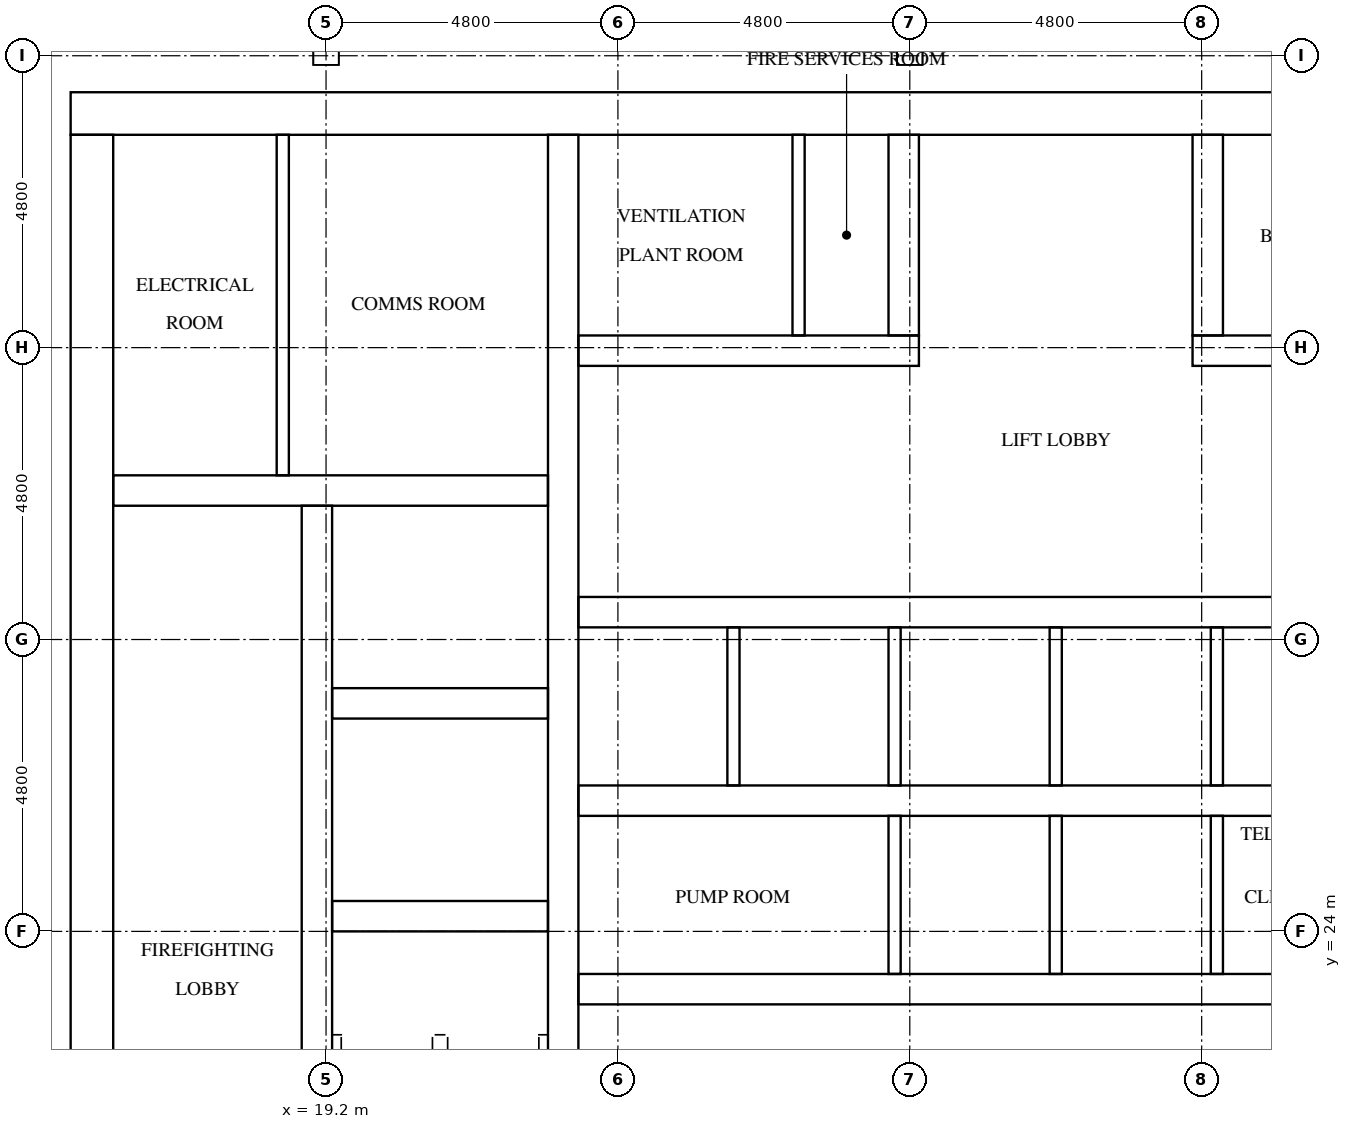
"""IFC4 building model, lengths in metres.
Left out: names, types, materials, properties, quantities, classifications, styles, units other than length and angle.
Written with IfcOpenShell. Run it as: python <this file> out.ifc"""

import sys

from ifc_helpers import new_model, si_unit, direction, frame, frame_2d, origin, place, context, subcontext, project, spatial, rectangle, extrude, element, fill, save


model = new_model("IFC4")
c1 = context("Model", 3, precision=1e-05, world=origin(), true_north=direction((0.0, 1.0)))
c2 = subcontext(c1, "Body", "Model", "MODEL_VIEW")
j1 = project(units=[si_unit("LENGTHUNIT", "METRE"), si_unit("PLANEANGLEUNIT", "RADIAN")], contexts=[c1])
p1 = place(None, origin())
s1 = spatial("IfcSite", under=j1, at=p1, CompositionType="ELEMENT")
p2 = place(p1, origin())
s2 = spatial("IfcBuilding", under=s1, at=p2, CompositionType="ELEMENT")
p3 = place(p2, frame((0.0, 0.0, 203.4)))
s3 = spatial("IfcBuildingStorey", under=s2, at=p3, CompositionType="ELEMENT", Elevation=203.4)
p4 = place(p3, frame((15.0, 37.45, 0.0), z_axis=(0.0, 0.0, 1.0), x_axis=(1.0, 0.0, 0.0)))
e1 = element("IfcWall", 1, at=p4, inside=s3, PredefinedType="SHEAR", context=c2, shape_type="SweptSolid", body=[
    extrude(rectangle(XDim=32.4, YDim=0.7, at=frame_2d((16.2, 0.0))), origin(), (0.0, 0.0, 1.0), 5.1),
])
p5 = place(p4, frame((15.3, 0.0, 0.0)))
e2 = element("IfcOpeningElement", 2, at=p5, cuts=e1, PredefinedType="OPENING", context=c2, shape_type="SweptSolid", body=[
    extrude(rectangle(XDim=1.8, YDim=2.1, at=frame_2d((0.9, 1.05))), frame((0.0, 0.36, 0.0), z_axis=(0.0, -1.0, 0.0), x_axis=(1.0, 0.0, 0.0)), (0.0, 0.0, 1.0), 0.72),
])
p6 = place(p4, frame((1.544, 0.0, 0.0)))
e3 = element("IfcOpeningElement", 3, at=p6, cuts=e1, PredefinedType="OPENING", context=c2, shape_type="SweptSolid", body=[
    extrude(rectangle(XDim=1.0, YDim=2.1, at=frame_2d((0.5, 1.05))), frame((0.0, 0.36, 0.0), z_axis=(0.0, -1.0, 0.0), x_axis=(1.0, 0.0, 0.0)), (0.0, 0.0, 1.0), 0.72),
])
p7 = place(p4, frame((5.219, 0.0, 0.0)))
e4 = element("IfcOpeningElement", 4, at=p7, cuts=e1, PredefinedType="OPENING", context=c2, shape_type="SweptSolid", body=[
    extrude(rectangle(XDim=1.0, YDim=2.1, at=frame_2d((0.5, 1.05))), frame((0.0, 0.36, 0.0), z_axis=(0.0, -1.0, 0.0), x_axis=(1.0, 0.0, 0.0)), (0.0, 0.0, 1.0), 0.72),
])
p8 = place(p3, frame((15.35, 15.7, 0.0), z_axis=(0.0, 0.0, 1.0), x_axis=(0.0, 1.0, 0.0)))
e5 = element("IfcWall", 5, at=p8, inside=s3, PredefinedType="SHEAR", context=c2, shape_type="SweptSolid", body=[
    extrude(rectangle(XDim=21.4, YDim=0.7, at=frame_2d((10.7, 0.0))), origin(), (0.0, 0.0, 1.0), 5.1),
])
p9 = place(p8, frame((5.06, 0.0, 0.0)))
e6 = element("IfcOpeningElement", 6, at=p9, cuts=e5, PredefinedType="OPENING", context=c2, shape_type="SweptSolid", body=[
    extrude(rectangle(XDim=1.2, YDim=2.1, at=frame_2d((0.6, 1.05))), frame((0.0, 0.36, 0.0), z_axis=(0.0, -1.0, 0.0), x_axis=(1.0, 0.0, 0.0)), (0.0, 0.0, 1.0), 0.72),
])
p10 = place(p3, frame((19.05, 15.7, 0.0), z_axis=(0.0, 0.0, 1.0), x_axis=(0.0, 1.0, 0.0)))
e7 = element("IfcWall", 7, at=p10, inside=s3, PredefinedType="SHEAR", context=c2, shape_type="SweptSolid", body=[
    extrude(rectangle(XDim=15.3, YDim=0.5, at=frame_2d((7.65, 0.0))), origin(), (0.0, 0.0, 1.0), 5.1),
])
p11 = place(p10, frame((9.75, 0.0, 0.0)))
e8 = element("IfcOpeningElement", 8, at=p11, cuts=e7, PredefinedType="OPENING", context=c2, shape_type="SweptSolid", body=[
    extrude(rectangle(XDim=1.1, YDim=2.1, at=frame_2d((0.55, 1.05))), frame((0.0, 0.26, 0.0), z_axis=(0.0, -1.0, 0.0), x_axis=(1.0, 0.0, 0.0)), (0.0, 0.0, 1.0), 0.52),
])
p12 = place(p10, frame((13.25, 0.0, 0.0)))
e9 = element("IfcOpeningElement", 9, at=p12, cuts=e7, PredefinedType="OPENING", context=c2, shape_type="SweptSolid", body=[
    extrude(rectangle(XDim=1.1, YDim=2.1, at=frame_2d((0.55, 1.05))), frame((0.0, 0.26, 0.0), z_axis=(0.0, -1.0, 0.0), x_axis=(1.0, 0.0, 0.0)), (0.0, 0.0, 1.0), 0.52),
])
p13 = place(p10, frame((0.5, 0.0, 0.0)))
e10 = element("IfcOpeningElement", 10, at=p13, cuts=e7, PredefinedType="OPENING", context=c2, shape_type="SweptSolid", body=[
    extrude(rectangle(XDim=1.2, YDim=2.1, at=frame_2d((0.6, 1.05))), frame((0.0, 0.26, 0.0), z_axis=(0.0, -1.0, 0.0), x_axis=(1.0, 0.0, 0.0)), (0.0, 0.0, 1.0), 0.52),
])
p14 = place(p3, frame((23.1, 15.7, 0.0), z_axis=(0.0, 0.0, 1.0), x_axis=(0.0, 1.0, 0.0)))
e11 = element("IfcWall", 11, at=p14, inside=s3, PredefinedType="SHEAR", context=c2, shape_type="SweptSolid", body=[
    extrude(rectangle(XDim=21.4, YDim=0.5, at=frame_2d((10.7, 0.0))), origin(), (0.0, 0.0, 1.0), 5.1),
])
for number, where, z_axis, x_axis in (
    (12, (19.3, 24.25, 0.0), (0.0, 0.0, 1.0), (1.0, 0.0, 0.0)),
    (13, (19.3, 27.75, 0.0), (0.0, 0.0, 1.0), (1.0, 0.0, 0.0)),
):
    element("IfcWall", number, at=place(p3, frame(where, z_axis=z_axis, x_axis=x_axis)), inside=s3, PredefinedType="SHEAR", context=c2, shape_type="SweptSolid", body=[
        extrude(rectangle(XDim=3.55, YDim=0.5, at=frame_2d((1.775, 0.0))), origin(), (0.0, 0.0, 1.0), 5.1),
    ])
p15 = place(p3, frame((15.7, 31.25, 0.0), z_axis=(0.0, 0.0, 1.0), x_axis=(1.0, 0.0, 0.0)))
e14 = element("IfcWall", 14, at=p15, inside=s3, PredefinedType="SHEAR", context=c2, shape_type="SweptSolid", body=[
    extrude(rectangle(XDim=7.15, YDim=0.5, at=frame_2d((3.575, 0.0))), origin(), (0.0, 0.0, 1.0), 5.1),
])
p16 = place(p3, frame((23.35, 23.05, 0.0), z_axis=(0.0, 0.0, 1.0), x_axis=(1.0, 0.0, 0.0)))
e15 = element("IfcWall", 15, at=p16, inside=s3, PredefinedType="SHEAR", context=c2, shape_type="SweptSolid", body=[
    extrude(rectangle(XDim=15.7, YDim=0.5, at=frame_2d((7.85, 0.0))), origin(), (0.0, 0.0, 1.0), 5.1),
])
p17 = place(p16, frame((2.05, 0.0, 0.0)))
e16 = element("IfcOpeningElement", 16, at=p17, cuts=e15, PredefinedType="OPENING", context=c2, shape_type="SweptSolid", body=[
    extrude(rectangle(XDim=1.0, YDim=2.1, at=frame_2d((0.5, 1.05))), frame((0.0, 0.26, 0.0), z_axis=(0.0, -1.0, 0.0), x_axis=(1.0, 0.0, 0.0)), (0.0, 0.0, 1.0), 0.52),
])
p18 = place(p16, frame((11.784, 0.0, 0.0)))
e17 = element("IfcOpeningElement", 17, at=p18, cuts=e15, PredefinedType="OPENING", context=c2, shape_type="SweptSolid", body=[
    extrude(rectangle(XDim=1.0, YDim=2.1, at=frame_2d((0.5, 1.05))), frame((0.0, 0.26, 0.0), z_axis=(0.0, -1.0, 0.0), x_axis=(1.0, 0.0, 0.0)), (0.0, 0.0, 1.0), 0.52),
])
p19 = place(p16, frame((14.434, 0.0, 0.0)))
e18 = element("IfcOpeningElement", 18, at=p19, cuts=e15, PredefinedType="OPENING", context=c2, shape_type="SweptSolid", body=[
    extrude(rectangle(XDim=1.0, YDim=2.1, at=frame_2d((0.5, 1.05))), frame((0.0, 0.26, 0.0), z_axis=(0.0, -1.0, 0.0), x_axis=(1.0, 0.0, 0.0)), (0.0, 0.0, 1.0), 0.52),
])
p20 = place(p3, frame((23.35, 26.15, 0.0), z_axis=(0.0, 0.0, 1.0), x_axis=(1.0, 0.0, 0.0)))
e19 = element("IfcWall", 19, at=p20, inside=s3, PredefinedType="SHEAR", context=c2, shape_type="SweptSolid", body=[
    extrude(rectangle(XDim=15.7, YDim=0.5, at=frame_2d((7.85, 0.0))), origin(), (0.0, 0.0, 1.0), 5.1),
])
p21 = place(p3, frame((23.35, 29.25, 0.0), z_axis=(0.0, 0.0, 1.0), x_axis=(1.0, 0.0, 0.0)))
e20 = element("IfcWall", 20, at=p21, inside=s3, PredefinedType="SHEAR", context=c2, shape_type="SweptSolid", body=[
    extrude(rectangle(XDim=15.7, YDim=0.5, at=frame_2d((7.85, 0.0))), origin(), (0.0, 0.0, 1.0), 5.1),
])
p22 = place(p21, frame((0.675, 0.0, 0.0)))
e21 = element("IfcOpeningElement", 21, at=p22, cuts=e20, PredefinedType="OPENING", context=c2, shape_type="SweptSolid", body=[
    extrude(rectangle(XDim=1.1, YDim=2.1, at=frame_2d((0.55, 1.05))), frame((0.0, 0.26, 0.0), z_axis=(0.0, -1.0, 0.0), x_axis=(1.0, 0.0, 0.0)), (0.0, 0.0, 1.0), 0.52),
])
p23 = place(p21, frame((3.325, 0.0, 0.0)))
e22 = element("IfcOpeningElement", 22, at=p23, cuts=e20, PredefinedType="OPENING", context=c2, shape_type="SweptSolid", body=[
    extrude(rectangle(XDim=1.1, YDim=2.1, at=frame_2d((0.55, 1.05))), frame((0.0, 0.26, 0.0), z_axis=(0.0, -1.0, 0.0), x_axis=(1.0, 0.0, 0.0)), (0.0, 0.0, 1.0), 0.52),
])
p24 = place(p21, frame((5.975, 0.0, 0.0)))
e23 = element("IfcOpeningElement", 23, at=p24, cuts=e20, PredefinedType="OPENING", context=c2, shape_type="SweptSolid", body=[
    extrude(rectangle(XDim=1.1, YDim=2.1, at=frame_2d((0.55, 1.05))), frame((0.0, 0.26, 0.0), z_axis=(0.0, -1.0, 0.0), x_axis=(1.0, 0.0, 0.0)), (0.0, 0.0, 1.0), 0.52),
])
p25 = place(p21, frame((8.625, 0.0, 0.0)))
e24 = element("IfcOpeningElement", 24, at=p25, cuts=e20, PredefinedType="OPENING", context=c2, shape_type="SweptSolid", body=[
    extrude(rectangle(XDim=1.1, YDim=2.1, at=frame_2d((0.55, 1.05))), frame((0.0, 0.26, 0.0), z_axis=(0.0, -1.0, 0.0), x_axis=(1.0, 0.0, 0.0)), (0.0, 0.0, 1.0), 0.52),
])
p26 = place(p21, frame((11.275, 0.0, 0.0)))
e25 = element("IfcOpeningElement", 25, at=p26, cuts=e20, PredefinedType="OPENING", context=c2, shape_type="SweptSolid", body=[
    extrude(rectangle(XDim=1.1, YDim=2.1, at=frame_2d((0.55, 1.05))), frame((0.0, 0.26, 0.0), z_axis=(0.0, -1.0, 0.0), x_axis=(1.0, 0.0, 0.0)), (0.0, 0.0, 1.0), 0.52),
])
p27 = place(p21, frame((13.925, 0.0, 0.0)))
e26 = element("IfcOpeningElement", 26, at=p27, cuts=e20, PredefinedType="OPENING", context=c2, shape_type="SweptSolid", body=[
    extrude(rectangle(XDim=1.1, YDim=2.1, at=frame_2d((0.55, 1.05))), frame((0.0, 0.26, 0.0), z_axis=(0.0, -1.0, 0.0), x_axis=(1.0, 0.0, 0.0)), (0.0, 0.0, 1.0), 0.52),
])
p28 = place(p3, frame((23.35, 33.55, 0.0), z_axis=(0.0, 0.0, 1.0), x_axis=(1.0, 0.0, 0.0)))
e27 = element("IfcWall", 27, at=p28, inside=s3, PredefinedType="SHEAR", context=c2, shape_type="SweptSolid", body=[
    extrude(rectangle(XDim=5.6, YDim=0.5, at=frame_2d((2.8, 0.0))), origin(), (0.0, 0.0, 1.0), 5.1),
])
p29 = place(p28, frame((1.26, 0.0, 0.0)))
e28 = element("IfcOpeningElement", 28, at=p29, cuts=e27, PredefinedType="OPENING", context=c2, shape_type="SweptSolid", body=[
    extrude(rectangle(XDim=1.0, YDim=2.1, at=frame_2d((0.5, 1.05))), frame((0.0, 0.26, 0.0), z_axis=(0.0, -1.0, 0.0), x_axis=(1.0, 0.0, 0.0)), (0.0, 0.0, 1.0), 0.52),
])
p30 = place(p28, frame((3.91, 0.0, 0.0)))
e29 = element("IfcOpeningElement", 29, at=p30, cuts=e27, PredefinedType="OPENING", context=c2, shape_type="SweptSolid", body=[
    extrude(rectangle(XDim=1.0, YDim=2.1, at=frame_2d((0.5, 1.05))), frame((0.0, 0.26, 0.0), z_axis=(0.0, -1.0, 0.0), x_axis=(1.0, 0.0, 0.0)), (0.0, 0.0, 1.0), 0.52),
])
p31 = place(p3, frame((33.45, 33.55, 0.0), z_axis=(0.0, 0.0, 1.0), x_axis=(1.0, 0.0, 0.0)))
e30 = element("IfcWall", 30, at=p31, inside=s3, PredefinedType="SHEAR", context=c2, shape_type="SweptSolid", body=[
    extrude(rectangle(XDim=5.6, YDim=0.5, at=frame_2d((2.8, 0.0))), origin(), (0.0, 0.0, 1.0), 5.1),
])
p32 = place(p31, frame((1.76, 0.0, 0.0)))
e31 = element("IfcOpeningElement", 31, at=p32, cuts=e30, PredefinedType="OPENING", context=c2, shape_type="SweptSolid", body=[
    extrude(rectangle(XDim=1.0, YDim=2.1, at=frame_2d((0.5, 1.05))), frame((0.0, 0.26, 0.0), z_axis=(0.0, -1.0, 0.0), x_axis=(1.0, 0.0, 0.0)), (0.0, 0.0, 1.0), 0.52),
])
p33 = place(p31, frame((4.41, 0.0, 0.0)))
e32 = element("IfcOpeningElement", 32, at=p33, cuts=e30, PredefinedType="OPENING", context=c2, shape_type="SweptSolid", body=[
    extrude(rectangle(XDim=1.0, YDim=2.1, at=frame_2d((0.5, 1.05))), frame((0.0, 0.26, 0.0), z_axis=(0.0, -1.0, 0.0), x_axis=(1.0, 0.0, 0.0)), (0.0, 0.0, 1.0), 0.52),
])
for number, where, z_axis, x_axis in (
    (33, (28.7, 33.8, 0.0), (0.0, 0.0, 1.0), (0.0, 1.0, 0.0)),
    (34, (33.7, 33.8, 0.0), (0.0, 0.0, 1.0), (0.0, 1.0, 0.0)),
):
    element("IfcWall", number, at=place(p3, frame(where, z_axis=z_axis, x_axis=x_axis)), inside=s3, PredefinedType="SHEAR", context=c2, shape_type="SweptSolid", body=[
        extrude(rectangle(XDim=3.3, YDim=0.5, at=frame_2d((1.65, 0.0))), origin(), (0.0, 0.0, 1.0), 5.1),
    ])
p34 = place(p3, frame((25.9, 26.4, 0.0), z_axis=(0.0, 0.0, 1.0), x_axis=(0.0, 1.0, 0.0)))
e35 = element("IfcWall", 35, at=p34, inside=s3, PredefinedType="SOLIDWALL", context=c2, shape_type="SweptSolid", body=[
    extrude(rectangle(XDim=2.6, YDim=0.2, at=frame_2d((1.3, 0.0))), origin(), (0.0, 0.0, 1.0), 5.1),
])
p35 = place(p3, frame((28.55, 23.3, 0.0), z_axis=(0.0, 0.0, 1.0), x_axis=(0.0, 1.0, 0.0)))
e36 = element("IfcWall", 36, at=p35, inside=s3, PredefinedType="SOLIDWALL", context=c2, shape_type="SweptSolid", body=[
    extrude(rectangle(XDim=2.6, YDim=0.2, at=frame_2d((1.3, 0.0))), origin(), (0.0, 0.0, 1.0), 5.1),
])
p36 = place(p3, frame((28.55, 26.4, 0.0), z_axis=(0.0, 0.0, 1.0), x_axis=(0.0, 1.0, 0.0)))
e37 = element("IfcWall", 37, at=p36, inside=s3, PredefinedType="SOLIDWALL", context=c2, shape_type="SweptSolid", body=[
    extrude(rectangle(XDim=2.6, YDim=0.2, at=frame_2d((1.3, 0.0))), origin(), (0.0, 0.0, 1.0), 5.1),
])
p37 = place(p3, frame((31.2, 23.3, 0.0), z_axis=(0.0, 0.0, 1.0), x_axis=(0.0, 1.0, 0.0)))
e38 = element("IfcWall", 38, at=p37, inside=s3, PredefinedType="SOLIDWALL", context=c2, shape_type="SweptSolid", body=[
    extrude(rectangle(XDim=2.6, YDim=0.2, at=frame_2d((1.3, 0.0))), origin(), (0.0, 0.0, 1.0), 5.1),
])
p38 = place(p3, frame((31.2, 26.4, 0.0), z_axis=(0.0, 0.0, 1.0), x_axis=(0.0, 1.0, 0.0)))
e39 = element("IfcWall", 39, at=p38, inside=s3, PredefinedType="SOLIDWALL", context=c2, shape_type="SweptSolid", body=[
    extrude(rectangle(XDim=2.6, YDim=0.2, at=frame_2d((1.3, 0.0))), origin(), (0.0, 0.0, 1.0), 5.1),
])
p39 = place(p3, frame((33.85, 23.3, 0.0), z_axis=(0.0, 0.0, 1.0), x_axis=(0.0, 1.0, 0.0)))
e40 = element("IfcWall", 40, at=p39, inside=s3, PredefinedType="SOLIDWALL", context=c2, shape_type="SweptSolid", body=[
    extrude(rectangle(XDim=2.6, YDim=0.2, at=frame_2d((1.3, 0.0))), origin(), (0.0, 0.0, 1.0), 5.1),
])
p40 = place(p3, frame((33.85, 26.4, 0.0), z_axis=(0.0, 0.0, 1.0), x_axis=(0.0, 1.0, 0.0)))
e41 = element("IfcWall", 41, at=p40, inside=s3, PredefinedType="SOLIDWALL", context=c2, shape_type="SweptSolid", body=[
    extrude(rectangle(XDim=2.6, YDim=0.2, at=frame_2d((1.3, 0.0))), origin(), (0.0, 0.0, 1.0), 5.1),
])
p41 = place(p3, frame((18.489, 31.5, 0.0), z_axis=(0.0, 0.0, 1.0), x_axis=(0.0, 1.0, 0.0)))
e42 = element("IfcWall", 42, at=p41, inside=s3, PredefinedType="PARTITIONING", context=c2, shape_type="SweptSolid", body=[
    extrude(rectangle(XDim=5.6, YDim=0.2, at=frame_2d((2.8, 0.0))), origin(), (0.0, 0.0, 1.0), 5.1),
])
p42 = place(p3, frame((26.971, 33.8, 0.0), z_axis=(0.0, 0.0, 1.0), x_axis=(0.0, 1.0, 0.0)))
e43 = element("IfcWall", 43, at=p42, inside=s3, PredefinedType="PARTITIONING", context=c2, shape_type="SweptSolid", body=[
    extrude(rectangle(XDim=3.3, YDim=0.2, at=frame_2d((1.65, 0.0))), origin(), (0.0, 0.0, 1.0), 5.1),
])
p43 = place(p22, origin())
e44 = element("IfcDoor", 44, at=p43, inside=s3, OperationType="DOUBLE_DOOR_SLIDING", PredefinedType="DOOR", context=c2, shape_type="SweptSolid", body=[
    extrude(rectangle(XDim=1.1, YDim=2.1, at=frame_2d((0.55, 1.05))), frame((0.0, 0.025, 0.0), z_axis=(0.0, -1.0, 0.0), x_axis=(1.0, 0.0, 0.0)), (0.0, 0.0, 1.0), 0.05),
])
fill(e21, e44)
p44 = place(p23, origin())
e45 = element("IfcDoor", 45, at=p44, inside=s3, OperationType="DOUBLE_DOOR_SLIDING", PredefinedType="DOOR", context=c2, shape_type="SweptSolid", body=[
    extrude(rectangle(XDim=1.1, YDim=2.1, at=frame_2d((0.55, 1.05))), frame((0.0, 0.025, 0.0), z_axis=(0.0, -1.0, 0.0), x_axis=(1.0, 0.0, 0.0)), (0.0, 0.0, 1.0), 0.05),
])
fill(e22, e45)
p45 = place(p24, origin())
e46 = element("IfcDoor", 46, at=p45, inside=s3, OperationType="DOUBLE_DOOR_SLIDING", PredefinedType="DOOR", context=c2, shape_type="SweptSolid", body=[
    extrude(rectangle(XDim=1.1, YDim=2.1, at=frame_2d((0.55, 1.05))), frame((0.0, 0.025, 0.0), z_axis=(0.0, -1.0, 0.0), x_axis=(1.0, 0.0, 0.0)), (0.0, 0.0, 1.0), 0.05),
])
fill(e23, e46)
p46 = place(p25, origin())
e47 = element("IfcDoor", 47, at=p46, inside=s3, OperationType="DOUBLE_DOOR_SLIDING", PredefinedType="DOOR", context=c2, shape_type="SweptSolid", body=[
    extrude(rectangle(XDim=1.1, YDim=2.1, at=frame_2d((0.55, 1.05))), frame((0.0, 0.025, 0.0), z_axis=(0.0, -1.0, 0.0), x_axis=(1.0, 0.0, 0.0)), (0.0, 0.0, 1.0), 0.05),
])
fill(e24, e47)
p47 = place(p26, origin())
e48 = element("IfcDoor", 48, at=p47, inside=s3, OperationType="DOUBLE_DOOR_SLIDING", PredefinedType="DOOR", context=c2, shape_type="SweptSolid", body=[
    extrude(rectangle(XDim=1.1, YDim=2.1, at=frame_2d((0.55, 1.05))), frame((0.0, 0.025, 0.0), z_axis=(0.0, -1.0, 0.0), x_axis=(1.0, 0.0, 0.0)), (0.0, 0.0, 1.0), 0.05),
])
fill(e25, e48)
p48 = place(p11, origin())
e49 = element("IfcDoor", 49, at=p48, inside=s3, OperationType="DOUBLE_DOOR_SLIDING", PredefinedType="DOOR", context=c2, shape_type="SweptSolid", body=[
    extrude(rectangle(XDim=1.1, YDim=2.1, at=frame_2d((0.55, 1.05))), frame((0.0, 0.025, 0.0), z_axis=(0.0, -1.0, 0.0), x_axis=(1.0, 0.0, 0.0)), (0.0, 0.0, 1.0), 0.05),
])
fill(e8, e49)
p49 = place(p12, origin())
e50 = element("IfcDoor", 50, at=p49, inside=s3, OperationType="DOUBLE_DOOR_SLIDING", PredefinedType="DOOR", context=c2, shape_type="SweptSolid", body=[
    extrude(rectangle(XDim=1.1, YDim=2.1, at=frame_2d((0.55, 1.05))), frame((0.0, 0.025, 0.0), z_axis=(0.0, -1.0, 0.0), x_axis=(1.0, 0.0, 0.0)), (0.0, 0.0, 1.0), 0.05),
])
fill(e9, e50)
p50 = place(p5, origin())
e51 = element("IfcDoor", 51, at=p50, inside=s3, OperationType="DOUBLE_DOOR_SINGLE_SWING", PredefinedType="DOOR", context=c2, shape_type="SweptSolid", body=[
    extrude(rectangle(XDim=1.8, YDim=2.1, at=frame_2d((0.9, 1.05))), frame((0.0, 0.025, 0.0), z_axis=(0.0, -1.0, 0.0), x_axis=(1.0, 0.0, 0.0)), (0.0, 0.0, 1.0), 0.05),
])
fill(e2, e51)
p51 = place(p6, origin())
e52 = element("IfcDoor", 52, at=p51, inside=s3, OperationType="SINGLE_SWING_RIGHT", PredefinedType="DOOR", context=c2, shape_type="SweptSolid", body=[
    extrude(rectangle(XDim=1.0, YDim=2.1, at=frame_2d((0.5, 1.05))), frame((0.0, 0.025, 0.0), z_axis=(0.0, -1.0, 0.0), x_axis=(1.0, 0.0, 0.0)), (0.0, 0.0, 1.0), 0.05),
])
fill(e3, e52)
p52 = place(p7, origin())
e53 = element("IfcDoor", 53, at=p52, inside=s3, OperationType="SINGLE_SWING_LEFT", PredefinedType="DOOR", context=c2, shape_type="SweptSolid", body=[
    extrude(rectangle(XDim=1.0, YDim=2.1, at=frame_2d((0.5, 1.05))), frame((0.0, 0.025, 0.0), z_axis=(0.0, -1.0, 0.0), x_axis=(1.0, 0.0, 0.0)), (0.0, 0.0, 1.0), 0.05),
])
fill(e4, e53)
p53 = place(p17, frame((1.0, 0.0, 0.0), z_axis=(0.0, 0.0, 1.0), x_axis=(-1.0, 0.0, 0.0)))
e54 = element("IfcDoor", 54, at=p53, inside=s3, OperationType="SINGLE_SWING_RIGHT", PredefinedType="DOOR", context=c2, shape_type="SweptSolid", body=[
    extrude(rectangle(XDim=1.0, YDim=2.1, at=frame_2d((0.5, 1.05))), frame((0.0, 0.025, 0.0), z_axis=(0.0, -1.0, 0.0), x_axis=(1.0, 0.0, 0.0)), (0.0, 0.0, 1.0), 0.05),
])
fill(e16, e54)
p54 = place(p29, frame((1.0, 0.0, 0.0), z_axis=(0.0, 0.0, 1.0), x_axis=(-1.0, 0.0, 0.0)))
e55 = element("IfcDoor", 55, at=p54, inside=s3, OperationType="SINGLE_SWING_LEFT", PredefinedType="DOOR", context=c2, shape_type="SweptSolid", body=[
    extrude(rectangle(XDim=1.0, YDim=2.1, at=frame_2d((0.5, 1.05))), frame((0.0, 0.025, 0.0), z_axis=(0.0, -1.0, 0.0), x_axis=(1.0, 0.0, 0.0)), (0.0, 0.0, 1.0), 0.05),
])
fill(e28, e55)
p55 = place(p30, frame((1.0, 0.0, 0.0), z_axis=(0.0, 0.0, 1.0), x_axis=(-1.0, 0.0, 0.0)))
e56 = element("IfcDoor", 56, at=p55, inside=s3, OperationType="SINGLE_SWING_RIGHT", PredefinedType="DOOR", context=c2, shape_type="SweptSolid", body=[
    extrude(rectangle(XDim=1.0, YDim=2.1, at=frame_2d((0.5, 1.05))), frame((0.0, 0.025, 0.0), z_axis=(0.0, -1.0, 0.0), x_axis=(1.0, 0.0, 0.0)), (0.0, 0.0, 1.0), 0.05),
])
fill(e29, e56)
save(model, sys.argv[1])
